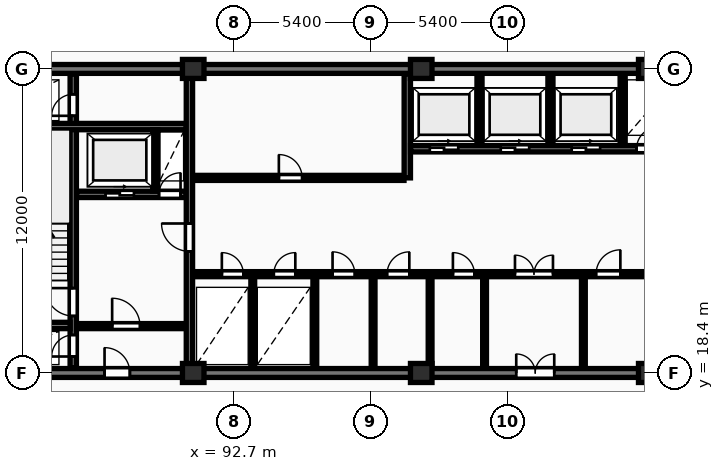
"""IFC4 building model, lengths in metres.
Left out: names, types, materials, properties, quantities, classifications, styles, units other than length and angle.
Written with IfcOpenShell. Run it as: python <this file> out.ifc"""

import sys

from ifc_helpers import new_model, si_unit, direction, frame, frame_2d, origin, origin_2d, place, context, subcontext, project, spatial, rectangle, extrude, element, fill, save


model = new_model("IFC4")
c1 = context("Model", 3, precision=1e-05, world=origin(), true_north=direction((0.0, 1.0)))
c2 = subcontext(c1, "Body", "Model", "MODEL_VIEW")
j1 = project(units=[si_unit("LENGTHUNIT", "METRE"), si_unit("PLANEANGLEUNIT", "RADIAN")], contexts=[c1])
p1 = place(None, origin())
s1 = spatial("IfcSite", under=j1, at=p1, CompositionType="ELEMENT")
p2 = place(p1, origin())
s2 = spatial("IfcBuilding", under=s1, at=p2, CompositionType="ELEMENT")
p3 = place(p2, frame((0.0, 0.0, 126.3)))
s3 = spatial("IfcBuildingStorey", under=s2, at=p3, CompositionType="ELEMENT", Elevation=126.3)
for number, where, z_axis, x_axis in (
    (1, (91.1, 18.4, 0.0), (0.0, 0.0, 1.0), (1.0, 0.0, 0.0)),
    (2, (91.1, 30.4, 0.0), (0.0, 0.0, 1.0), (1.0, 0.0, 0.0)),
    (3, (100.1, 18.4, 0.0), (0.0, 0.0, 1.0), (1.0, 0.0, 0.0)),
    (4, (100.1, 30.4, 0.0), (0.0, 0.0, 1.0), (1.0, 0.0, 0.0)),
    (5, (109.1, 18.4, 0.0), (0.0, 0.0, 1.0), (1.0, 0.0, 0.0)),
    (6, (109.1, 30.4, 0.0), (0.0, 0.0, 1.0), (1.0, 0.0, 0.0)),
):
    element("IfcColumn", number, at=place(p3, frame(where, z_axis=z_axis, x_axis=x_axis)), inside=s3, PredefinedType="COLUMN", context=c2, shape_type="SweptSolid", body=[
        extrude(rectangle(XDim=0.85, YDim=0.75, at=origin_2d()), origin(), (0.0, 0.0, 1.0), 3.25),
    ])
p4 = place(p3, frame((81.925, 30.4, 0.0), z_axis=(0.0, 0.0, 1.0), x_axis=(1.0, 0.0, 0.0)))
e7 = element("IfcWall", 7, at=p4, inside=s3, PredefinedType="SHEAR", context=c2, shape_type="SweptSolid", body=[
    extrude(rectangle(XDim=36.265, YDim=0.35, at=frame_2d((18.132, 0.0))), origin(), (0.0, 0.0, 1.0), 3.25),
])
p5 = place(p3, frame((81.925, 18.4, 0.0), z_axis=(0.0, 0.0, 1.0), x_axis=(1.0, 0.0, 0.0)))
e8 = element("IfcWall", 8, at=p5, inside=s3, PredefinedType="SHEAR", context=c2, shape_type="SweptSolid", body=[
    extrude(rectangle(XDim=36.265, YDim=0.35, at=frame_2d((18.132, 0.0))), origin(), (0.0, 0.0, 1.0), 3.25),
])
p6 = place(p5, frame((5.675, 0.0, 0.0)))
e9 = element("IfcOpeningElement", 9, at=p6, cuts=e8, PredefinedType="OPENING", context=c2, shape_type="SweptSolid", body=[
    extrude(rectangle(XDim=1.0, YDim=2.15, at=frame_2d((0.5, 1.075))), frame((0.0, 0.185, 0.0), z_axis=(0.0, -1.0, 0.0), x_axis=(1.0, 0.0, 0.0)), (0.0, 0.0, 1.0), 0.37),
])
p7 = place(p5, frame((21.925, 0.0, 0.0)))
e10 = element("IfcOpeningElement", 10, at=p7, cuts=e8, PredefinedType="OPENING", context=c2, shape_type="SweptSolid", body=[
    extrude(rectangle(XDim=1.5, YDim=2.2, at=frame_2d((0.75, 1.1))), frame((0.0, 0.185, 0.0), z_axis=(0.0, -1.0, 0.0), x_axis=(1.0, 0.0, 0.0)), (0.0, 0.0, 1.0), 0.37),
])
p8 = place(p5, frame((29.875, 0.0, 0.0)))
e11 = element("IfcOpeningElement", 11, at=p8, cuts=e8, PredefinedType="OPENING", context=c2, shape_type="SweptSolid", body=[
    extrude(rectangle(XDim=1.0, YDim=2.15, at=frame_2d((0.5, 1.075))), frame((0.0, 0.185, 0.0), z_axis=(0.0, -1.0, 0.0), x_axis=(1.0, 0.0, 0.0)), (0.0, 0.0, 1.0), 0.37),
])
p9 = place(p3, frame((86.365, 18.6, 0.0), z_axis=(0.0, 0.0, 1.0), x_axis=(0.0, 1.0, 0.0)))
e12 = element("IfcWall", 12, at=p9, inside=s3, PredefinedType="SHEAR", context=c2, shape_type="SweptSolid", body=[
    extrude(rectangle(XDim=11.6, YDim=0.25, at=frame_2d((5.8, 0.0))), origin(), (0.0, 0.0, 1.0), 3.25),
])
p10 = place(p9, frame((0.45, 0.0, 0.0)))
e13 = element("IfcOpeningElement", 13, at=p10, cuts=e12, PredefinedType="OPENING", context=c2, shape_type="SweptSolid", body=[
    extrude(rectangle(XDim=0.85, YDim=2.05, at=frame_2d((0.425, 1.025))), frame((0.0, 0.135, 0.0), z_axis=(0.0, -1.0, 0.0), x_axis=(1.0, 0.0, 0.0)), (0.0, 0.0, 1.0), 0.27),
])
p11 = place(p9, frame((2.05, 0.0, 0.0)))
e14 = element("IfcOpeningElement", 14, at=p11, cuts=e12, PredefinedType="OPENING", context=c2, shape_type="SweptSolid", body=[
    extrude(rectangle(XDim=1.1, YDim=2.1, at=frame_2d((0.55, 1.05))), frame((0.0, 0.135, 0.0), z_axis=(0.0, -1.0, 0.0), x_axis=(1.0, 0.0, 0.0)), (0.0, 0.0, 1.0), 0.27),
])
p12 = place(p9, frame((9.95, 0.0, 0.0)))
e15 = element("IfcOpeningElement", 15, at=p12, cuts=e12, PredefinedType="OPENING", context=c2, shape_type="SweptSolid", body=[
    extrude(rectangle(XDim=0.85, YDim=2.05, at=frame_2d((0.425, 1.025))), frame((0.0, 0.135, 0.0), z_axis=(0.0, -1.0, 0.0), x_axis=(1.0, 0.0, 0.0)), (0.0, 0.0, 1.0), 0.27),
])
p13 = place(p3, frame((83.0, 20.275, 0.0), z_axis=(0.0, 0.0, 1.0), x_axis=(1.0, 0.0, 0.0)))
e16 = element("IfcWall", 16, at=p13, inside=s3, PredefinedType="SHEAR", context=c2, shape_type="SweptSolid", body=[
    extrude(rectangle(XDim=3.24, YDim=0.25, at=frame_2d((1.62, 0.0))), origin(), (0.0, 0.0, 1.0), 3.25),
])
p14 = place(p3, frame((83.0, 28.125, 0.0), z_axis=(0.0, 0.0, 1.0), x_axis=(1.0, 0.0, 0.0)))
e17 = element("IfcWall", 17, at=p14, inside=s3, PredefinedType="SHEAR", context=c2, shape_type="SweptSolid", body=[
    extrude(rectangle(XDim=7.82, YDim=0.25, at=frame_2d((3.91, 0.0))), origin(), (0.0, 0.0, 1.0), 3.25),
])
p15 = place(p3, frame((86.5, 25.45, 0.0), z_axis=(0.0, 0.0, 1.0), x_axis=(1.0, 0.0, 0.0)))
e18 = element("IfcWall", 18, at=p15, inside=s3, PredefinedType="SHEAR", context=c2, shape_type="SweptSolid", body=[
    extrude(rectangle(XDim=4.32, YDim=0.25, at=frame_2d((2.16, 0.0))), origin(), (0.0, 0.0, 1.0), 3.25),
])
p16 = place(p15, frame((1.14, 0.0, 0.0)))
e19 = element("IfcOpeningElement", 19, at=p16, cuts=e18, PredefinedType="OPENING", context=c2, shape_type="SweptSolid", body=[
    extrude(rectangle(XDim=1.12, YDim=2.12, at=frame_2d((0.56, 1.06))), frame((0.0, 0.135, 0.0), z_axis=(0.0, -1.0, 0.0), x_axis=(1.0, 0.0, 0.0)), (0.0, 0.0, 1.0), 0.27),
])
p17 = place(p15, frame((3.25, 0.0, 0.0)))
e20 = element("IfcOpeningElement", 20, at=p17, cuts=e18, PredefinedType="OPENING", context=c2, shape_type="SweptSolid", body=[
    extrude(rectangle(XDim=0.85, YDim=2.05, at=frame_2d((0.425, 1.025))), frame((0.0, 0.135, 0.0), z_axis=(0.0, -1.0, 0.0), x_axis=(1.0, 0.0, 0.0)), (0.0, 0.0, 1.0), 0.27),
])
p18 = place(p3, frame((89.6, 25.58, 0.0), z_axis=(0.0, 0.0, 1.0), x_axis=(0.0, 1.0, 0.0)))
e21 = element("IfcWall", 21, at=p18, inside=s3, PredefinedType="PARTITIONING", context=c2, shape_type="SweptSolid", body=[
    extrude(rectangle(XDim=2.42, YDim=0.2, at=frame_2d((1.21, 0.0))), origin(), (0.0, 0.0, 1.0), 2.97),
])
p19 = place(p3, frame((86.5, 20.25, 0.0), z_axis=(0.0, 0.0, 1.0), x_axis=(1.0, 0.0, 0.0)))
e22 = element("IfcWall", 22, at=p19, inside=s3, PredefinedType="PARTITIONING", context=c2, shape_type="SweptSolid", body=[
    extrude(rectangle(XDim=4.32, YDim=0.2, at=frame_2d((2.16, 0.0))), origin(), (0.0, 0.0, 1.0), 2.97),
])
p20 = place(p19, frame((1.4, 0.0, 0.0)))
e23 = element("IfcOpeningElement", 23, at=p20, cuts=e22, PredefinedType="OPENING", context=c2, shape_type="SweptSolid", body=[
    extrude(rectangle(XDim=1.1, YDim=2.1, at=frame_2d((0.55, 1.05))), frame((0.0, 0.11, 0.0), z_axis=(0.0, -1.0, 0.0), x_axis=(1.0, 0.0, 0.0)), (0.0, 0.0, 1.0), 0.22),
])
p21 = place(p3, frame((90.95, 18.6, 0.0), z_axis=(0.0, 0.0, 1.0), x_axis=(0.0, 1.0, 0.0)))
e24 = element("IfcWall", 24, at=p21, inside=s3, PredefinedType="SHEAR", context=c2, shape_type="SweptSolid", body=[
    extrude(rectangle(XDim=11.6, YDim=0.25, at=frame_2d((5.8, 0.0))), origin(), (0.0, 0.0, 1.0), 3.25),
])
p22 = place(p21, frame((4.6, 0.0, 0.0)))
e25 = element("IfcOpeningElement", 25, at=p22, cuts=e24, PredefinedType="OPENING", context=c2, shape_type="SweptSolid", body=[
    extrude(rectangle(XDim=1.1, YDim=2.1, at=frame_2d((0.55, 1.05))), frame((0.0, 0.135, 0.0), z_axis=(0.0, -1.0, 0.0), x_axis=(1.0, 0.0, 0.0)), (0.0, 0.0, 1.0), 0.27),
])
p23 = place(p3, frame((91.08, 26.1, 0.0), z_axis=(0.0, 0.0, 1.0), x_axis=(1.0, 0.0, 0.0)))
e26 = element("IfcWall", 26, at=p23, inside=s3, PredefinedType="PARTITIONING", context=c2, shape_type="SweptSolid", body=[
    extrude(rectangle(XDim=8.34, YDim=0.2, at=frame_2d((4.17, 0.0))), origin(), (0.0, 0.0, 1.0), 2.97),
])
p24 = place(p23, frame((3.4, 0.0, 0.0)))
e27 = element("IfcOpeningElement", 27, at=p24, cuts=e26, PredefinedType="OPENING", context=c2, shape_type="SweptSolid", body=[
    extrude(rectangle(XDim=0.92, YDim=2.08, at=frame_2d((0.46, 1.04))), frame((0.0, 0.11, 0.0), z_axis=(0.0, -1.0, 0.0), x_axis=(1.0, 0.0, 0.0)), (0.0, 0.0, 1.0), 0.22),
])
p25 = place(p3, frame((99.55, 26.1, 0.0), z_axis=(0.0, 0.0, 1.0), x_axis=(0.0, 1.0, 0.0)))
e28 = element("IfcWall", 28, at=p25, inside=s3, PredefinedType="SHEAR", context=c2, shape_type="SweptSolid", body=[
    extrude(rectangle(XDim=4.1, YDim=0.25, at=frame_2d((2.05, 0.0))), origin(), (0.0, 0.0, 1.0), 3.25),
])
for number, where, z_axis, x_axis in (
    (29, (102.4, 27.38, 0.0), (0.0, 0.0, 1.0), (0.0, 1.0, 0.0)),
    (30, (105.2, 27.38, 0.0), (0.0, 0.0, 1.0), (0.0, 1.0, 0.0)),
    (31, (108.05, 27.38, 0.0), (0.0, 0.0, 1.0), (0.0, 1.0, 0.0)),
):
    element("IfcWall", number, at=place(p3, frame(where, z_axis=z_axis, x_axis=x_axis)), inside=s3, PredefinedType="PARTITIONING", context=c2, shape_type="SweptSolid", body=[
        extrude(rectangle(XDim=2.82, YDim=0.2, at=frame_2d((1.41, 0.0))), origin(), (0.0, 0.0, 1.0), 2.97),
    ])
p26 = place(p3, frame((99.68, 27.25, 0.0), z_axis=(0.0, 0.0, 1.0), x_axis=(1.0, 0.0, 0.0)))
e32 = element("IfcWall", 32, at=p26, inside=s3, PredefinedType="SHEAR", context=c2, shape_type="SweptSolid", body=[
    extrude(rectangle(XDim=10.54, YDim=0.25, at=frame_2d((5.27, 0.0))), origin(), (0.0, 0.0, 1.0), 3.25),
])
p27 = place(p26, frame((0.76, 0.0, 0.0)))
e33 = element("IfcOpeningElement", 33, at=p27, cuts=e32, PredefinedType="OPENING", context=c2, shape_type="SweptSolid", body=[
    extrude(rectangle(XDim=1.12, YDim=2.12, at=frame_2d((0.56, 1.06))), frame((0.0, 0.135, 0.0), z_axis=(0.0, -1.0, 0.0), x_axis=(1.0, 0.0, 0.0)), (0.0, 0.0, 1.0), 0.27),
])
p28 = place(p26, frame((3.56, 0.0, 0.0)))
e34 = element("IfcOpeningElement", 34, at=p28, cuts=e32, PredefinedType="OPENING", context=c2, shape_type="SweptSolid", body=[
    extrude(rectangle(XDim=1.12, YDim=2.12, at=frame_2d((0.56, 1.06))), frame((0.0, 0.135, 0.0), z_axis=(0.0, -1.0, 0.0), x_axis=(1.0, 0.0, 0.0)), (0.0, 0.0, 1.0), 0.27),
])
p29 = place(p26, frame((6.36, 0.0, 0.0)))
e35 = element("IfcOpeningElement", 35, at=p29, cuts=e32, PredefinedType="OPENING", context=c2, shape_type="SweptSolid", body=[
    extrude(rectangle(XDim=1.12, YDim=2.12, at=frame_2d((0.56, 1.06))), frame((0.0, 0.135, 0.0), z_axis=(0.0, -1.0, 0.0), x_axis=(1.0, 0.0, 0.0)), (0.0, 0.0, 1.0), 0.27),
])
p30 = place(p26, frame((8.92, 0.0, 0.0)))
e36 = element("IfcOpeningElement", 36, at=p30, cuts=e32, PredefinedType="OPENING", context=c2, shape_type="SweptSolid", body=[
    extrude(rectangle(XDim=0.85, YDim=2.05, at=frame_2d((0.425, 1.025))), frame((0.0, 0.135, 0.0), z_axis=(0.0, -1.0, 0.0), x_axis=(1.0, 0.0, 0.0)), (0.0, 0.0, 1.0), 0.27),
])
for number, where, z_axis, x_axis in (
    (37, (93.45, 18.6, 0.0), (0.0, 0.0, 1.0), (0.0, 1.0, 0.0)),
    (38, (95.9, 18.6, 0.0), (0.0, 0.0, 1.0), (0.0, 1.0, 0.0)),
    (39, (98.2, 18.6, 0.0), (0.0, 0.0, 1.0), (0.0, 1.0, 0.0)),
    (40, (100.45, 18.6, 0.0), (0.0, 0.0, 1.0), (0.0, 1.0, 0.0)),
    (41, (102.6, 18.6, 0.0), (0.0, 0.0, 1.0), (0.0, 1.0, 0.0)),
    (42, (106.5, 18.6, 0.0), (0.0, 0.0, 1.0), (0.0, 1.0, 0.0)),
):
    element("IfcWall", number, at=place(p3, frame(where, z_axis=z_axis, x_axis=x_axis)), inside=s3, PredefinedType="PARTITIONING", context=c2, shape_type="SweptSolid", body=[
        extrude(rectangle(XDim=3.6, YDim=0.15, at=frame_2d((1.8, 0.0))), origin(), (0.0, 0.0, 1.0), 2.97),
    ])
p31 = place(p3, frame((91.08, 22.3, 0.0), z_axis=(0.0, 0.0, 1.0), x_axis=(1.0, 0.0, 0.0)))
e43 = element("IfcWall", 43, at=p31, inside=s3, PredefinedType="PARTITIONING", context=c2, shape_type="SweptSolid", body=[
    extrude(rectangle(XDim=19.14, YDim=0.2, at=frame_2d((9.57, 0.0))), origin(), (0.0, 0.0, 1.0), 2.97),
])
p32 = place(p31, frame((1.15, 0.0, 0.0)))
e44 = element("IfcOpeningElement", 44, at=p32, cuts=e43, PredefinedType="OPENING", context=c2, shape_type="SweptSolid", body=[
    extrude(rectangle(XDim=0.85, YDim=2.05, at=frame_2d((0.425, 1.025))), frame((0.0, 0.11, 0.0), z_axis=(0.0, -1.0, 0.0), x_axis=(1.0, 0.0, 0.0)), (0.0, 0.0, 1.0), 0.22),
])
p33 = place(p31, frame((3.2, 0.0, 0.0)))
e45 = element("IfcOpeningElement", 45, at=p33, cuts=e43, PredefinedType="OPENING", context=c2, shape_type="SweptSolid", body=[
    extrude(rectangle(XDim=0.85, YDim=2.05, at=frame_2d((0.425, 1.025))), frame((0.0, 0.11, 0.0), z_axis=(0.0, -1.0, 0.0), x_axis=(1.0, 0.0, 0.0)), (0.0, 0.0, 1.0), 0.22),
])
p34 = place(p31, frame((12.72, 0.0, 0.0)))
e46 = element("IfcOpeningElement", 46, at=p34, cuts=e43, PredefinedType="OPENING", context=c2, shape_type="SweptSolid", body=[
    extrude(rectangle(XDim=1.5, YDim=2.2, at=frame_2d((0.75, 1.1))), frame((0.0, 0.11, 0.0), z_axis=(0.0, -1.0, 0.0), x_axis=(1.0, 0.0, 0.0)), (0.0, 0.0, 1.0), 0.22),
])
p35 = place(p31, frame((5.52, 0.0, 0.0)))
e47 = element("IfcOpeningElement", 47, at=p35, cuts=e43, PredefinedType="OPENING", context=c2, shape_type="SweptSolid", body=[
    extrude(rectangle(XDim=0.88, YDim=2.06, at=frame_2d((0.44, 1.03))), frame((0.0, 0.11, 0.0), z_axis=(0.0, -1.0, 0.0), x_axis=(1.0, 0.0, 0.0)), (0.0, 0.0, 1.0), 0.22),
])
p36 = place(p31, frame((7.67, 0.0, 0.0)))
e48 = element("IfcOpeningElement", 48, at=p36, cuts=e43, PredefinedType="OPENING", context=c2, shape_type="SweptSolid", body=[
    extrude(rectangle(XDim=0.88, YDim=2.06, at=frame_2d((0.44, 1.03))), frame((0.0, 0.11, 0.0), z_axis=(0.0, -1.0, 0.0), x_axis=(1.0, 0.0, 0.0)), (0.0, 0.0, 1.0), 0.22),
])
p37 = place(p31, frame((10.27, 0.0, 0.0)))
e49 = element("IfcOpeningElement", 49, at=p37, cuts=e43, PredefinedType="OPENING", context=c2, shape_type="SweptSolid", body=[
    extrude(rectangle(XDim=0.85, YDim=2.05, at=frame_2d((0.425, 1.025))), frame((0.0, 0.11, 0.0), z_axis=(0.0, -1.0, 0.0), x_axis=(1.0, 0.0, 0.0)), (0.0, 0.0, 1.0), 0.22),
])
p38 = place(p31, frame((15.92, 0.0, 0.0)))
e50 = element("IfcOpeningElement", 50, at=p38, cuts=e43, PredefinedType="OPENING", context=c2, shape_type="SweptSolid", body=[
    extrude(rectangle(XDim=0.96, YDim=2.1, at=frame_2d((0.48, 1.05))), frame((0.0, 0.11, 0.0), z_axis=(0.0, -1.0, 0.0), x_axis=(1.0, 0.0, 0.0)), (0.0, 0.0, 1.0), 0.22),
])
p39 = place(p6, origin())
e51 = element("IfcDoor", 51, at=p39, inside=s3, OperationType="SINGLE_SWING_LEFT", PredefinedType="DOOR", context=c2, shape_type="SweptSolid", body=[
    extrude(rectangle(XDim=1.0, YDim=2.15, at=frame_2d((0.5, 1.075))), frame((0.0, 0.025, 0.0), z_axis=(0.0, -1.0, 0.0), x_axis=(1.0, 0.0, 0.0)), (0.0, 0.0, 1.0), 0.05),
])
fill(e9, e51)
p40 = place(p7, origin())
e52 = element("IfcDoor", 52, at=p40, inside=s3, OperationType="DOUBLE_DOOR_SINGLE_SWING", PredefinedType="DOOR", context=c2, shape_type="SweptSolid", body=[
    extrude(rectangle(XDim=1.5, YDim=2.2, at=frame_2d((0.75, 1.1))), frame((0.0, 0.025, 0.0), z_axis=(0.0, -1.0, 0.0), x_axis=(1.0, 0.0, 0.0)), (0.0, 0.0, 1.0), 0.05),
])
fill(e10, e52)
p41 = place(p10, origin())
e53 = element("IfcDoor", 53, at=p41, inside=s3, OperationType="SINGLE_SWING_LEFT", PredefinedType="DOOR", context=c2, shape_type="SweptSolid", body=[
    extrude(rectangle(XDim=0.85, YDim=2.05, at=frame_2d((0.425, 1.025))), frame((0.0, 0.025, 0.0), z_axis=(0.0, -1.0, 0.0), x_axis=(1.0, 0.0, 0.0)), (0.0, 0.0, 1.0), 0.05),
])
fill(e13, e53)
p42 = place(p11, origin())
e54 = element("IfcDoor", 54, at=p42, inside=s3, OperationType="SINGLE_SWING_RIGHT", PredefinedType="DOOR", context=c2, shape_type="SweptSolid", body=[
    extrude(rectangle(XDim=1.1, YDim=2.1, at=frame_2d((0.55, 1.05))), frame((0.0, 0.025, 0.0), z_axis=(0.0, -1.0, 0.0), x_axis=(1.0, 0.0, 0.0)), (0.0, 0.0, 1.0), 0.05),
])
fill(e14, e54)
p43 = place(p12, origin())
e55 = element("IfcDoor", 55, at=p43, inside=s3, OperationType="SINGLE_SWING_LEFT", PredefinedType="DOOR", context=c2, shape_type="SweptSolid", body=[
    extrude(rectangle(XDim=0.85, YDim=2.05, at=frame_2d((0.425, 1.025))), frame((0.0, 0.025, 0.0), z_axis=(0.0, -1.0, 0.0), x_axis=(1.0, 0.0, 0.0)), (0.0, 0.0, 1.0), 0.05),
])
fill(e15, e55)
p44 = place(p16, origin())
e56 = element("IfcDoor", 56, at=p44, inside=s3, OperationType="SLIDING_TO_RIGHT", PredefinedType="DOOR", context=c2, shape_type="SweptSolid", body=[
    extrude(rectangle(XDim=1.12, YDim=2.12, at=frame_2d((0.56, 1.06))), frame((0.0, 0.025, 0.0), z_axis=(0.0, -1.0, 0.0), x_axis=(1.0, 0.0, 0.0)), (0.0, 0.0, 1.0), 0.05),
])
fill(e19, e56)
p45 = place(p17, origin())
e57 = element("IfcDoor", 57, at=p45, inside=s3, OperationType="SINGLE_SWING_RIGHT", PredefinedType="DOOR", context=c2, shape_type="SweptSolid", body=[
    extrude(rectangle(XDim=0.85, YDim=2.05, at=frame_2d((0.425, 1.025))), frame((0.0, 0.025, 0.0), z_axis=(0.0, -1.0, 0.0), x_axis=(1.0, 0.0, 0.0)), (0.0, 0.0, 1.0), 0.05),
])
fill(e20, e57)
p46 = place(p20, origin())
e58 = element("IfcDoor", 58, at=p46, inside=s3, OperationType="SINGLE_SWING_LEFT", PredefinedType="DOOR", context=c2, shape_type="SweptSolid", body=[
    extrude(rectangle(XDim=1.1, YDim=2.1, at=frame_2d((0.55, 1.05))), frame((0.0, 0.025, 0.0), z_axis=(0.0, -1.0, 0.0), x_axis=(1.0, 0.0, 0.0)), (0.0, 0.0, 1.0), 0.05),
])
fill(e23, e58)
p47 = place(p22, origin())
e59 = element("IfcDoor", 59, at=p47, inside=s3, OperationType="SINGLE_SWING_RIGHT", PredefinedType="DOOR", context=c2, shape_type="SweptSolid", body=[
    extrude(rectangle(XDim=1.1, YDim=2.1, at=frame_2d((0.55, 1.05))), frame((0.0, 0.025, 0.0), z_axis=(0.0, -1.0, 0.0), x_axis=(1.0, 0.0, 0.0)), (0.0, 0.0, 1.0), 0.05),
])
fill(e25, e59)
p48 = place(p24, origin())
e60 = element("IfcDoor", 60, at=p48, inside=s3, OperationType="SINGLE_SWING_LEFT", PredefinedType="DOOR", context=c2, shape_type="SweptSolid", body=[
    extrude(rectangle(XDim=0.92, YDim=2.08, at=frame_2d((0.46, 1.04))), frame((0.0, 0.025, 0.0), z_axis=(0.0, -1.0, 0.0), x_axis=(1.0, 0.0, 0.0)), (0.0, 0.0, 1.0), 0.05),
])
fill(e27, e60)
p49 = place(p27, origin())
e61 = element("IfcDoor", 61, at=p49, inside=s3, OperationType="SLIDING_TO_RIGHT", PredefinedType="DOOR", context=c2, shape_type="SweptSolid", body=[
    extrude(rectangle(XDim=1.12, YDim=2.12, at=frame_2d((0.56, 1.06))), frame((0.0, 0.025, 0.0), z_axis=(0.0, -1.0, 0.0), x_axis=(1.0, 0.0, 0.0)), (0.0, 0.0, 1.0), 0.05),
])
fill(e33, e61)
p50 = place(p28, origin())
e62 = element("IfcDoor", 62, at=p50, inside=s3, OperationType="SLIDING_TO_RIGHT", PredefinedType="DOOR", context=c2, shape_type="SweptSolid", body=[
    extrude(rectangle(XDim=1.12, YDim=2.12, at=frame_2d((0.56, 1.06))), frame((0.0, 0.025, 0.0), z_axis=(0.0, -1.0, 0.0), x_axis=(1.0, 0.0, 0.0)), (0.0, 0.0, 1.0), 0.05),
])
fill(e34, e62)
p51 = place(p29, origin())
e63 = element("IfcDoor", 63, at=p51, inside=s3, OperationType="SLIDING_TO_RIGHT", PredefinedType="DOOR", context=c2, shape_type="SweptSolid", body=[
    extrude(rectangle(XDim=1.12, YDim=2.12, at=frame_2d((0.56, 1.06))), frame((0.0, 0.025, 0.0), z_axis=(0.0, -1.0, 0.0), x_axis=(1.0, 0.0, 0.0)), (0.0, 0.0, 1.0), 0.05),
])
fill(e35, e63)
p52 = place(p30, origin())
e64 = element("IfcDoor", 64, at=p52, inside=s3, OperationType="SINGLE_SWING_RIGHT", PredefinedType="DOOR", context=c2, shape_type="SweptSolid", body=[
    extrude(rectangle(XDim=0.85, YDim=2.05, at=frame_2d((0.425, 1.025))), frame((0.0, 0.025, 0.0), z_axis=(0.0, -1.0, 0.0), x_axis=(1.0, 0.0, 0.0)), (0.0, 0.0, 1.0), 0.05),
])
fill(e36, e64)
p53 = place(p32, origin())
e65 = element("IfcDoor", 65, at=p53, inside=s3, OperationType="SINGLE_SWING_LEFT", PredefinedType="DOOR", context=c2, shape_type="SweptSolid", body=[
    extrude(rectangle(XDim=0.85, YDim=2.05, at=frame_2d((0.425, 1.025))), frame((0.0, 0.025, 0.0), z_axis=(0.0, -1.0, 0.0), x_axis=(1.0, 0.0, 0.0)), (0.0, 0.0, 1.0), 0.05),
])
fill(e44, e65)
p54 = place(p33, origin())
e66 = element("IfcDoor", 66, at=p54, inside=s3, OperationType="SINGLE_SWING_RIGHT", PredefinedType="DOOR", context=c2, shape_type="SweptSolid", body=[
    extrude(rectangle(XDim=0.85, YDim=2.05, at=frame_2d((0.425, 1.025))), frame((0.0, 0.025, 0.0), z_axis=(0.0, -1.0, 0.0), x_axis=(1.0, 0.0, 0.0)), (0.0, 0.0, 1.0), 0.05),
])
fill(e45, e66)
p55 = place(p34, origin())
e67 = element("IfcDoor", 67, at=p55, inside=s3, OperationType="DOUBLE_DOOR_SINGLE_SWING", PredefinedType="DOOR", context=c2, shape_type="SweptSolid", body=[
    extrude(rectangle(XDim=1.5, YDim=2.2, at=frame_2d((0.75, 1.1))), frame((0.0, 0.025, 0.0), z_axis=(0.0, -1.0, 0.0), x_axis=(1.0, 0.0, 0.0)), (0.0, 0.0, 1.0), 0.05),
])
fill(e46, e67)
p56 = place(p35, origin())
e68 = element("IfcDoor", 68, at=p56, inside=s3, OperationType="SINGLE_SWING_LEFT", PredefinedType="DOOR", context=c2, shape_type="SweptSolid", body=[
    extrude(rectangle(XDim=0.88, YDim=2.06, at=frame_2d((0.44, 1.03))), frame((0.0, 0.025, 0.0), z_axis=(0.0, -1.0, 0.0), x_axis=(1.0, 0.0, 0.0)), (0.0, 0.0, 1.0), 0.05),
])
fill(e47, e68)
p57 = place(p36, origin())
e69 = element("IfcDoor", 69, at=p57, inside=s3, OperationType="SINGLE_SWING_RIGHT", PredefinedType="DOOR", context=c2, shape_type="SweptSolid", body=[
    extrude(rectangle(XDim=0.88, YDim=2.06, at=frame_2d((0.44, 1.03))), frame((0.0, 0.025, 0.0), z_axis=(0.0, -1.0, 0.0), x_axis=(1.0, 0.0, 0.0)), (0.0, 0.0, 1.0), 0.05),
])
fill(e48, e69)
p58 = place(p37, origin())
e70 = element("IfcDoor", 70, at=p58, inside=s3, OperationType="SINGLE_SWING_LEFT", PredefinedType="DOOR", context=c2, shape_type="SweptSolid", body=[
    extrude(rectangle(XDim=0.85, YDim=2.05, at=frame_2d((0.425, 1.025))), frame((0.0, 0.025, 0.0), z_axis=(0.0, -1.0, 0.0), x_axis=(1.0, 0.0, 0.0)), (0.0, 0.0, 1.0), 0.05),
])
fill(e49, e70)
p59 = place(p38, origin())
e71 = element("IfcDoor", 71, at=p59, inside=s3, OperationType="SINGLE_SWING_RIGHT", PredefinedType="DOOR", context=c2, shape_type="SweptSolid", body=[
    extrude(rectangle(XDim=0.96, YDim=2.1, at=frame_2d((0.48, 1.05))), frame((0.0, 0.025, 0.0), z_axis=(0.0, -1.0, 0.0), x_axis=(1.0, 0.0, 0.0)), (0.0, 0.0, 1.0), 0.05),
])
fill(e50, e71)
save(model, sys.argv[1])
